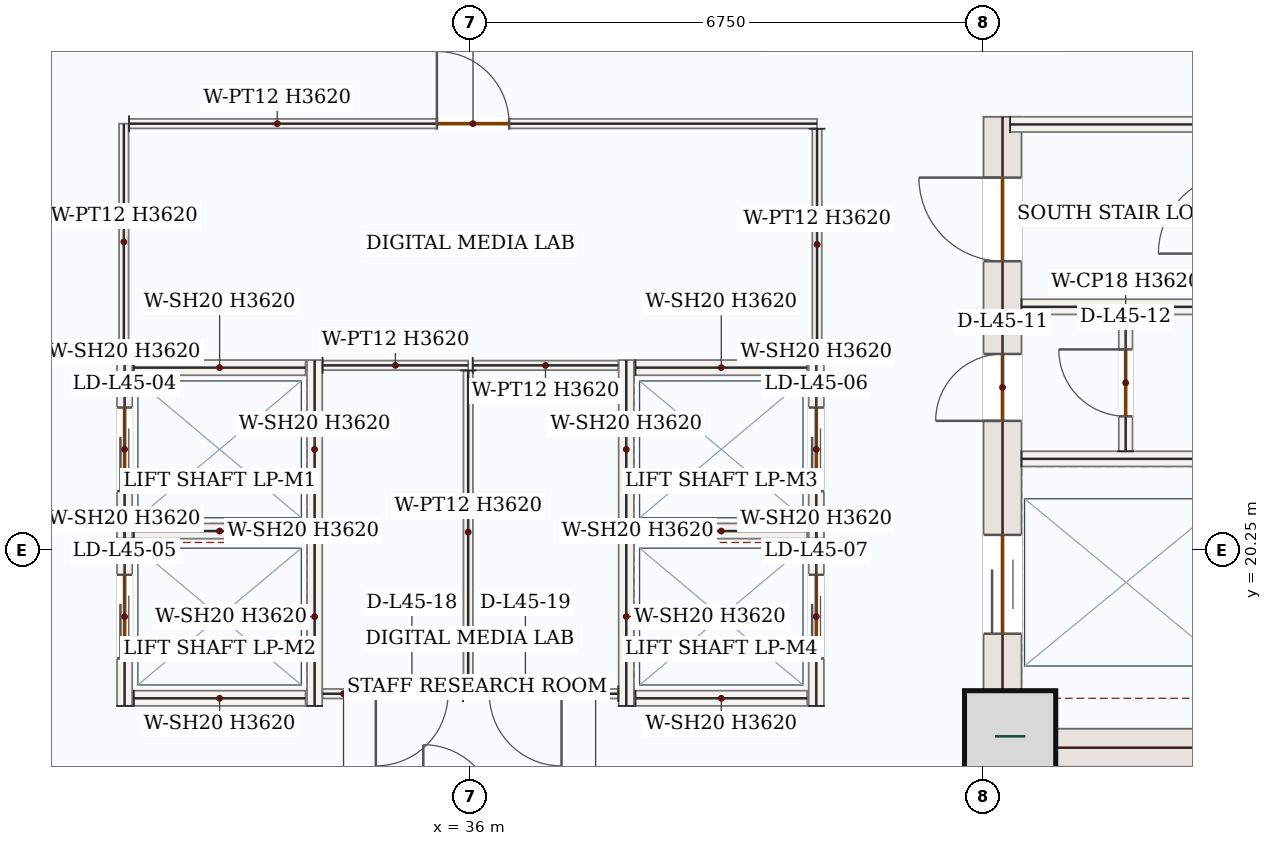
"""IFC4 building model, lengths in metres.
Left out: names, types, materials, properties, quantities, classifications, styles, units other than length and angle.
Written with IfcOpenShell. Run it as: python <this file> out.ifc"""

import sys

from ifc_helpers import new_model, si_unit, direction, frame, frame_2d, origin, origin_2d, place, context, subcontext, project, spatial, rectangle, extrude, source, transform, mapped, element, fill, save


model = new_model("IFC4")
c1 = context("Model", 3, precision=1e-05, world=origin(), true_north=direction((0.0, 1.0)))
c2 = subcontext(c1, "Body", "Model", "MODEL_VIEW")
j1 = project(units=[si_unit("LENGTHUNIT", "METRE"), si_unit("PLANEANGLEUNIT", "RADIAN")], contexts=[c1])
p1 = place(None, origin())
s1 = spatial("IfcSite", under=j1, at=p1, CompositionType="ELEMENT")
p2 = place(p1, origin())
s2 = spatial("IfcBuilding", under=s1, at=p2, CompositionType="ELEMENT")
p3 = place(p2, frame((0.0, 0.0, 194.1)))
s3 = spatial("IfcBuildingStorey", under=s2, at=p3, CompositionType="ELEMENT", Elevation=194.1)
p4 = place(p3, frame((43.0, 17.4, 0.0), z_axis=(0.0, 0.0, 1.0), x_axis=(0.0, 1.0, 0.0)))
e1 = element("IfcWall", 1, at=p4, inside=s3, PredefinedType="SHEAR", context=c2, shape_type="SweptSolid", body=[
    extrude(rectangle(XDim=8.55, YDim=0.5, at=frame_2d((4.275, 0.0))), origin(), (0.0, 0.0, 1.0), 3.62),
])
p5 = place(p4, frame((6.65, 0.0, 0.0)))
e2 = element("IfcOpeningElement", 2, at=p5, cuts=e1, PredefinedType="OPENING", context=c2, shape_type="SweptSolid", body=[
    extrude(rectangle(XDim=1.1, YDim=2.2, at=frame_2d((0.55, 1.1))), frame((0.0, 0.26, 0.0), z_axis=(0.0, -1.0, 0.0), x_axis=(1.0, 0.0, 0.0)), (0.0, 0.0, 1.0), 0.52),
])
p6 = place(p4, frame((1.75, 0.0, 0.0)))
e3 = element("IfcOpeningElement", 3, at=p6, cuts=e1, PredefinedType="OPENING", context=c2, shape_type="SweptSolid", body=[
    extrude(rectangle(XDim=1.3, YDim=2.2, at=frame_2d((0.65, 1.1))), frame((0.0, 0.26, 0.0), z_axis=(0.0, -1.0, 0.0), x_axis=(1.0, 0.0, 0.0)), (0.0, 0.0, 1.0), 0.52),
])
p7 = place(p4, frame((4.55, 0.0, 0.0)))
e4 = element("IfcOpeningElement", 4, at=p7, cuts=e1, PredefinedType="OPENING", context=c2, shape_type="SweptSolid", body=[
    extrude(rectangle(XDim=0.88, YDim=2.1, at=frame_2d((0.44, 1.05))), frame((0.0, 0.26, 0.0), z_axis=(0.0, -1.0, 0.0), x_axis=(1.0, 0.0, 0.0)), (0.0, 0.0, 1.0), 0.52),
])
m1 = source(origin(), c2, "Body", "SweptSolid", [
    extrude(rectangle(XDim=7.0, YDim=0.5, at=frame_2d((3.5, 0.0))), origin(), (0.0, 0.0, 1.0), 3.62),
])
p8 = place(p3, frame((43.25, 17.65, 0.0), z_axis=(0.0, 0.0, 1.0), x_axis=(1.0, 0.0, 0.0)))
e5 = element("IfcWall", 5, at=p8, inside=s3, PredefinedType="SHEAR", context=c2, shape_type="MappedRepresentation", body=[
    mapped(m1, transform((0.0, 0.0, 0.0), x_axis=(1.0, 0.0, 0.0), y_axis=(0.0, 1.0, 0.0), z_axis=(0.0, 0.0, 1.0), scale=1.0)),
])
m2 = source(origin(), c2, "Body", "SweptSolid", [
    extrude(rectangle(XDim=1.2, YDim=1.2, at=origin_2d()), origin(), (0.0, 0.0, 1.0), 3.9),
])
p9 = place(p3, frame((43.1, 17.8, 0.0), z_axis=(0.0, 0.0, 1.0), x_axis=(1.0, 0.0, 0.0)))
e6 = element("IfcColumn", 6, at=p9, inside=s3, PredefinedType="COLUMN", context=c2, shape_type="MappedRepresentation", body=[
    mapped(m2, transform((0.0, 0.0, 0.0), x_axis=(1.0, 0.0, 0.0), y_axis=(0.0, 1.0, 0.0), z_axis=(0.0, 0.0, 1.0), scale=1.0)),
])
m3 = source(origin(), c2, "Body", "SweptSolid", [
    extrude(rectangle(XDim=3.0, YDim=0.2, at=frame_2d((1.5, 0.0))), origin(), (0.0, 0.0, 1.0), 3.62),
])
p10 = place(p3, frame((43.1, 25.85, 0.0), z_axis=(0.0, 0.0, 1.0), x_axis=(1.0, 0.0, 0.0)))
e7 = element("IfcWall", 7, at=p10, inside=s3, PredefinedType="SOLIDWALL", context=c2, shape_type="MappedRepresentation", body=[
    mapped(m3, transform((0.0, 0.0, 0.0), x_axis=(1.0, 0.0, 0.0), y_axis=(0.0, 1.0, 0.0), z_axis=(0.0, 0.0, 1.0), scale=1.0)),
])
m4 = source(origin(), c2, "Body", "SweptSolid", [
    extrude(rectangle(XDim=2.75, YDim=0.2, at=frame_2d((1.375, 0.0))), origin(), (0.0, 0.0, 1.0), 3.62),
])
for number, where, z_axis, x_axis in (
    (8, (43.25, 23.45, 0.0), (0.0, 0.0, 1.0), (1.0, 0.0, 0.0)),
    (9, (43.25, 21.45, 0.0), (0.0, 0.0, 1.0), (1.0, 0.0, 0.0)),
):
    element("IfcWall", number, at=place(p3, frame(where, z_axis=z_axis, x_axis=x_axis)), inside=s3, PredefinedType="SOLIDWALL", context=c2, shape_type="MappedRepresentation", body=[
        mapped(m4, transform((0.0, 0.0, 0.0), x_axis=(1.0, 0.0, 0.0), y_axis=(0.0, 1.0, 0.0), z_axis=(0.0, 0.0, 1.0), scale=1.0)),
    ])
p11 = place(p3, frame((44.62, 21.55, 0.0), z_axis=(0.0, 0.0, 1.0), x_axis=(0.0, 1.0, 0.0)))
e10 = element("IfcWall", 10, at=p11, inside=s3, PredefinedType="PARTITIONING", context=c2, shape_type="SweptSolid", body=[
    extrude(rectangle(XDim=1.8, YDim=0.18, at=frame_2d((0.9, 0.0))), origin(), (0.0, 0.0, 1.0), 3.62),
])
p12 = place(p11, frame((0.46, 0.0, 0.0)))
e11 = element("IfcOpeningElement", 11, at=p12, cuts=e10, PredefinedType="OPENING", context=c2, shape_type="SweptSolid", body=[
    extrude(rectangle(XDim=0.88, YDim=2.1, at=frame_2d((0.44, 1.05))), frame((0.0, 0.1, 0.0), z_axis=(0.0, -1.0, 0.0), x_axis=(1.0, 0.0, 0.0)), (0.0, 0.0, 1.0), 0.2),
])
p13 = place(p3, frame((31.45, 20.4, 0.0), z_axis=(0.0, 0.0, 1.0), x_axis=(0.0, 1.0, 0.0)))
e12 = element("IfcWall", 12, at=p13, inside=s3, PredefinedType="SOLIDWALL", context=c2, shape_type="SweptSolid", body=[
    extrude(rectangle(XDim=2.35, YDim=0.2, at=frame_2d((1.175, 0.0))), origin(), (0.0, 0.0, 1.0), 3.62),
])
p14 = place(p13, frame((0.625, 0.0, 0.0)))
e13 = element("IfcOpeningElement", 13, at=p14, cuts=e12, PredefinedType="OPENING", context=c2, shape_type="SweptSolid", body=[
    extrude(rectangle(XDim=1.1, YDim=2.15, at=frame_2d((0.55, 1.075))), frame((0.0, 0.11, 0.0), z_axis=(0.0, -1.0, 0.0), x_axis=(1.0, 0.0, 0.0)), (0.0, 0.0, 1.0), 0.22),
])
m5 = source(origin(), c2, "Body", "SweptSolid", [
    extrude(rectangle(XDim=2.35, YDim=0.2, at=frame_2d((1.175, 0.0))), origin(), (0.0, 0.0, 1.0), 3.62),
])
p15 = place(p3, frame((33.95, 20.4, 0.0), z_axis=(0.0, 0.0, 1.0), x_axis=(0.0, 1.0, 0.0)))
e14 = element("IfcWall", 14, at=p15, inside=s3, PredefinedType="SOLIDWALL", context=c2, shape_type="MappedRepresentation", body=[
    mapped(m5, transform((0.0, 0.0, 0.0), x_axis=(1.0, 0.0, 0.0), y_axis=(0.0, 1.0, 0.0), z_axis=(0.0, 0.0, 1.0), scale=1.0)),
])
m6 = source(origin(), c2, "Body", "SweptSolid", [
    extrude(rectangle(XDim=2.26, YDim=0.2, at=frame_2d((1.13, 0.0))), origin(), (0.0, 0.0, 1.0), 3.62),
])
for number, where, z_axis, x_axis in (
    (15, (31.57, 20.5, 0.0), (0.0, 0.0, 1.0), (1.0, 0.0, 0.0)),
    (16, (31.57, 22.65, 0.0), (0.0, 0.0, 1.0), (1.0, 0.0, 0.0)),
):
    element("IfcWall", number, at=place(p3, frame(where, z_axis=z_axis, x_axis=x_axis)), inside=s3, PredefinedType="SOLIDWALL", context=c2, shape_type="MappedRepresentation", body=[
        mapped(m6, transform((0.0, 0.0, 0.0), x_axis=(1.0, 0.0, 0.0), y_axis=(0.0, 1.0, 0.0), z_axis=(0.0, 0.0, 1.0), scale=1.0)),
    ])
p16 = place(p3, frame((31.45, 18.2, 0.0), z_axis=(0.0, 0.0, 1.0), x_axis=(0.0, 1.0, 0.0)))
e17 = element("IfcWall", 17, at=p16, inside=s3, PredefinedType="SOLIDWALL", context=c2, shape_type="SweptSolid", body=[
    extrude(rectangle(XDim=2.35, YDim=0.2, at=frame_2d((1.175, 0.0))), origin(), (0.0, 0.0, 1.0), 3.62),
])
p17 = place(p16, frame((0.625, 0.0, 0.0)))
e18 = element("IfcOpeningElement", 18, at=p17, cuts=e17, PredefinedType="OPENING", context=c2, shape_type="SweptSolid", body=[
    extrude(rectangle(XDim=1.1, YDim=2.15, at=frame_2d((0.55, 1.075))), frame((0.0, 0.11, 0.0), z_axis=(0.0, -1.0, 0.0), x_axis=(1.0, 0.0, 0.0)), (0.0, 0.0, 1.0), 0.22),
])
p18 = place(p3, frame((33.95, 18.2, 0.0), z_axis=(0.0, 0.0, 1.0), x_axis=(0.0, 1.0, 0.0)))
e19 = element("IfcWall", 19, at=p18, inside=s3, PredefinedType="SOLIDWALL", context=c2, shape_type="MappedRepresentation", body=[
    mapped(m5, transform((0.0, 0.0, 0.0), x_axis=(1.0, 0.0, 0.0), y_axis=(0.0, 1.0, 0.0), z_axis=(0.0, 0.0, 1.0), scale=1.0)),
])
p19 = place(p3, frame((31.57, 18.3, 0.0), z_axis=(0.0, 0.0, 1.0), x_axis=(1.0, 0.0, 0.0)))
e20 = element("IfcWall", 20, at=p19, inside=s3, PredefinedType="SOLIDWALL", context=c2, shape_type="MappedRepresentation", body=[
    mapped(m6, transform((0.0, 0.0, 0.0), x_axis=(1.0, 0.0, 0.0), y_axis=(0.0, 1.0, 0.0), z_axis=(0.0, 0.0, 1.0), scale=1.0)),
])
p20 = place(p3, frame((38.05, 20.4, 0.0), z_axis=(0.0, 0.0, 1.0), x_axis=(0.0, 1.0, 0.0)))
e21 = element("IfcWall", 21, at=p20, inside=s3, PredefinedType="SOLIDWALL", context=c2, shape_type="MappedRepresentation", body=[
    mapped(m5, transform((0.0, 0.0, 0.0), x_axis=(1.0, 0.0, 0.0), y_axis=(0.0, 1.0, 0.0), z_axis=(0.0, 0.0, 1.0), scale=1.0)),
])
p21 = place(p3, frame((40.55, 20.4, 0.0), z_axis=(0.0, 0.0, 1.0), x_axis=(0.0, 1.0, 0.0)))
e22 = element("IfcWall", 22, at=p21, inside=s3, PredefinedType="SOLIDWALL", context=c2, shape_type="SweptSolid", body=[
    extrude(rectangle(XDim=2.35, YDim=0.2, at=frame_2d((1.175, 0.0))), origin(), (0.0, 0.0, 1.0), 3.62),
])
p22 = place(p21, frame((0.625, 0.0, 0.0)))
e23 = element("IfcOpeningElement", 23, at=p22, cuts=e22, PredefinedType="OPENING", context=c2, shape_type="SweptSolid", body=[
    extrude(rectangle(XDim=1.1, YDim=2.15, at=frame_2d((0.55, 1.075))), frame((0.0, 0.11, 0.0), z_axis=(0.0, -1.0, 0.0), x_axis=(1.0, 0.0, 0.0)), (0.0, 0.0, 1.0), 0.22),
])
for number, where, z_axis, x_axis in (
    (24, (38.17, 20.5, 0.0), (0.0, 0.0, 1.0), (1.0, 0.0, 0.0)),
    (25, (38.17, 22.65, 0.0), (0.0, 0.0, 1.0), (1.0, 0.0, 0.0)),
):
    element("IfcWall", number, at=place(p3, frame(where, z_axis=z_axis, x_axis=x_axis)), inside=s3, PredefinedType="SOLIDWALL", context=c2, shape_type="MappedRepresentation", body=[
        mapped(m6, transform((0.0, 0.0, 0.0), x_axis=(1.0, 0.0, 0.0), y_axis=(0.0, 1.0, 0.0), z_axis=(0.0, 0.0, 1.0), scale=1.0)),
    ])
p23 = place(p3, frame((38.05, 18.2, 0.0), z_axis=(0.0, 0.0, 1.0), x_axis=(0.0, 1.0, 0.0)))
e26 = element("IfcWall", 26, at=p23, inside=s3, PredefinedType="SOLIDWALL", context=c2, shape_type="MappedRepresentation", body=[
    mapped(m5, transform((0.0, 0.0, 0.0), x_axis=(1.0, 0.0, 0.0), y_axis=(0.0, 1.0, 0.0), z_axis=(0.0, 0.0, 1.0), scale=1.0)),
])
p24 = place(p3, frame((40.55, 18.2, 0.0), z_axis=(0.0, 0.0, 1.0), x_axis=(0.0, 1.0, 0.0)))
e27 = element("IfcWall", 27, at=p24, inside=s3, PredefinedType="SOLIDWALL", context=c2, shape_type="SweptSolid", body=[
    extrude(rectangle(XDim=2.35, YDim=0.2, at=frame_2d((1.175, 0.0))), origin(), (0.0, 0.0, 1.0), 3.62),
])
p25 = place(p24, frame((0.625, 0.0, 0.0)))
e28 = element("IfcOpeningElement", 28, at=p25, cuts=e27, PredefinedType="OPENING", context=c2, shape_type="SweptSolid", body=[
    extrude(rectangle(XDim=1.1, YDim=2.15, at=frame_2d((0.55, 1.075))), frame((0.0, 0.11, 0.0), z_axis=(0.0, -1.0, 0.0), x_axis=(1.0, 0.0, 0.0)), (0.0, 0.0, 1.0), 0.22),
])
p26 = place(p3, frame((38.17, 18.3, 0.0), z_axis=(0.0, 0.0, 1.0), x_axis=(1.0, 0.0, 0.0)))
e29 = element("IfcWall", 29, at=p26, inside=s3, PredefinedType="SOLIDWALL", context=c2, shape_type="MappedRepresentation", body=[
    mapped(m6, transform((0.0, 0.0, 0.0), x_axis=(1.0, 0.0, 0.0), y_axis=(0.0, 1.0, 0.0), z_axis=(0.0, 0.0, 1.0), scale=1.0)),
])
m7 = source(origin(), c2, "Body", "SweptSolid", [
    extrude(rectangle(XDim=1.915, YDim=0.125, at=frame_2d((0.958, 0.0))), origin(), (0.0, 0.0, 1.0), 3.62),
])
p27 = place(p3, frame((34.055, 22.68, 0.0), z_axis=(0.0, 0.0, 1.0), x_axis=(1.0, 0.0, 0.0)))
e30 = element("IfcWall", 30, at=p27, inside=s3, PredefinedType="PARTITIONING", context=c2, shape_type="MappedRepresentation", body=[
    mapped(m7, transform((0.0, 0.0, 0.0), x_axis=(1.0, 0.0, 0.0), y_axis=(0.0, 1.0, 0.0), z_axis=(0.0, 0.0, 1.0), scale=1.0)),
])
m8 = source(origin(), c2, "Body", "SweptSolid", [
    extrude(rectangle(XDim=4.252, YDim=0.125, at=frame_2d((2.126, 0.0))), origin(), (0.0, 0.0, 1.0), 3.62),
])
p28 = place(p3, frame((35.97, 22.613, 0.0), z_axis=(0.0, 0.0, 1.0), x_axis=(0.0, -1.0, 0.0)))
e31 = element("IfcWall", 31, at=p28, inside=s3, PredefinedType="PARTITIONING", context=c2, shape_type="MappedRepresentation", body=[
    mapped(m8, transform((0.0, 0.0, 0.0), x_axis=(1.0, 0.0, 0.0), y_axis=(0.0, 1.0, 0.0), z_axis=(0.0, 0.0, 1.0), scale=1.0)),
])
p29 = place(p3, frame((35.903, 18.36, 0.0), z_axis=(0.0, 0.0, 1.0), x_axis=(-1.0, 0.0, 0.0)))
e32 = element("IfcWall", 32, at=p29, inside=s3, PredefinedType="PARTITIONING", context=c2, shape_type="SweptSolid", body=[
    extrude(rectangle(XDim=1.848, YDim=0.125, at=frame_2d((0.924, 0.0))), origin(), (0.0, 0.0, 1.0), 3.62),
])
p30 = place(p29, frame((0.198, 0.0, 0.0)))
e33 = element("IfcOpeningElement", 33, at=p30, cuts=e32, PredefinedType="OPENING", context=c2, shape_type="SweptSolid", body=[
    extrude(rectangle(XDim=0.95, YDim=2.15, at=frame_2d((0.475, 1.075))), frame((0.0, 0.073, 0.0), z_axis=(0.0, -1.0, 0.0), x_axis=(1.0, 0.0, 0.0)), (0.0, 0.0, 1.0), 0.145),
])
p31 = place(p3, frame((36.03, 22.68, 0.0), z_axis=(0.0, 0.0, 1.0), x_axis=(1.0, 0.0, 0.0)))
e34 = element("IfcWall", 34, at=p31, inside=s3, PredefinedType="PARTITIONING", context=c2, shape_type="MappedRepresentation", body=[
    mapped(m7, transform((0.0, 0.0, 0.0), x_axis=(1.0, 0.0, 0.0), y_axis=(0.0, 1.0, 0.0), z_axis=(0.0, 0.0, 1.0), scale=1.0)),
])
p32 = place(p3, frame((37.945, 18.36, 0.0), z_axis=(0.0, 0.0, 1.0), x_axis=(-1.0, 0.0, 0.0)))
e35 = element("IfcWall", 35, at=p32, inside=s3, PredefinedType="PARTITIONING", context=c2, shape_type="SweptSolid", body=[
    extrude(rectangle(XDim=1.907, YDim=0.125, at=frame_2d((0.954, 0.0))), origin(), (0.0, 0.0, 1.0), 3.62),
])
p33 = place(p32, frame((0.747, 0.0, 0.0)))
e36 = element("IfcOpeningElement", 36, at=p33, cuts=e35, PredefinedType="OPENING", context=c2, shape_type="SweptSolid", body=[
    extrude(rectangle(XDim=0.95, YDim=2.15, at=frame_2d((0.475, 1.075))), frame((0.0, 0.073, 0.0), z_axis=(0.0, -1.0, 0.0), x_axis=(1.0, 0.0, 0.0)), (0.0, 0.0, 1.0), 0.145),
])
m9 = source(origin(), c2, "Body", "SweptSolid", [
    extrude(rectangle(XDim=3.11, YDim=0.125, at=frame_2d((1.555, 0.0))), origin(), (0.0, 0.0, 1.0), 3.62),
])
p34 = place(p3, frame((31.44, 22.75, 0.0), z_axis=(0.0, 0.0, 1.0), x_axis=(0.0, 1.0, 0.0)))
e37 = element("IfcWall", 37, at=p34, inside=s3, PredefinedType="PARTITIONING", context=c2, shape_type="MappedRepresentation", body=[
    mapped(m9, transform((0.0, 0.0, 0.0), x_axis=(1.0, 0.0, 0.0), y_axis=(0.0, 1.0, 0.0), z_axis=(0.0, 0.0, 1.0), scale=1.0)),
])
p35 = place(p3, frame((31.508, 25.86, 0.0), z_axis=(0.0, 0.0, 1.0), x_axis=(1.0, 0.0, 0.0)))
e38 = element("IfcWall", 38, at=p35, inside=s3, PredefinedType="PARTITIONING", context=c2, shape_type="SweptSolid", body=[
    extrude(rectangle(XDim=9.052, YDim=0.125, at=frame_2d((4.526, 0.0))), origin(), (0.0, 0.0, 1.0), 3.62),
])
p36 = place(p35, frame((4.051, 0.0, 0.0)))
e39 = element("IfcOpeningElement", 39, at=p36, cuts=e38, PredefinedType="OPENING", context=c2, shape_type="SweptSolid", body=[
    extrude(rectangle(XDim=0.95, YDim=2.15, at=frame_2d((0.475, 1.075))), frame((0.0, 0.073, 0.0), z_axis=(0.0, -1.0, 0.0), x_axis=(1.0, 0.0, 0.0)), (0.0, 0.0, 1.0), 0.145),
])
m10 = source(origin(), c2, "Body", "SweptSolid", [
    extrude(rectangle(XDim=3.042, YDim=0.125, at=frame_2d((1.521, 0.0))), origin(), (0.0, 0.0, 1.0), 3.62),
])
p37 = place(p3, frame((40.56, 25.792, 0.0), z_axis=(0.0, 0.0, 1.0), x_axis=(0.0, -1.0, 0.0)))
e40 = element("IfcWall", 40, at=p37, inside=s3, PredefinedType="PARTITIONING", context=c2, shape_type="MappedRepresentation", body=[
    mapped(m10, transform((0.0, 0.0, 0.0), x_axis=(1.0, 0.0, 0.0), y_axis=(0.0, 1.0, 0.0), z_axis=(0.0, 0.0, 1.0), scale=1.0)),
])
m11 = source(origin(), c2, "Body", "SweptSolid", [
    extrude(rectangle(XDim=1.1, YDim=2.2, at=frame_2d((0.55, 1.1))), frame((0.0, 0.025, 0.0), z_axis=(0.0, -1.0, 0.0), x_axis=(1.0, 0.0, 0.0)), (0.0, 0.0, 1.0), 0.05),
])
p38 = place(p5, origin())
e41 = element("IfcDoor", 41, at=p38, inside=s3, OperationType="SINGLE_SWING_RIGHT", PredefinedType="DOOR", context=c2, shape_type="MappedRepresentation", body=[
    mapped(m11, transform((0.0, 0.0, 0.0), x_axis=(1.0, 0.0, 0.0), y_axis=(0.0, 1.0, 0.0), z_axis=(0.0, 0.0, 1.0), scale=1.0)),
])
fill(e2, e41)
m12 = source(origin(), c2, "Body", "SweptSolid", [
    extrude(rectangle(XDim=1.3, YDim=2.2, at=frame_2d((0.65, 1.1))), frame((0.0, 0.025, 0.0), z_axis=(0.0, -1.0, 0.0), x_axis=(1.0, 0.0, 0.0)), (0.0, 0.0, 1.0), 0.05),
])
p39 = place(p6, origin())
e42 = element("IfcDoor", 42, at=p39, inside=s3, OperationType="DOUBLE_DOOR_SLIDING", PredefinedType="DOOR", context=c2, shape_type="MappedRepresentation", body=[
    mapped(m12, transform((0.0, 0.0, 0.0), x_axis=(1.0, 0.0, 0.0), y_axis=(0.0, 1.0, 0.0), z_axis=(0.0, 0.0, 1.0), scale=1.0)),
])
fill(e3, e42)
m13 = source(origin(), c2, "Body", "SweptSolid", [
    extrude(rectangle(XDim=0.88, YDim=2.1, at=frame_2d((0.44, 1.05))), frame((0.0, 0.025, 0.0), z_axis=(0.0, -1.0, 0.0), x_axis=(1.0, 0.0, 0.0)), (0.0, 0.0, 1.0), 0.05),
])
p40 = place(p7, origin())
e43 = element("IfcDoor", 43, at=p40, inside=s3, OperationType="SINGLE_SWING_LEFT", PredefinedType="DOOR", context=c2, shape_type="MappedRepresentation", body=[
    mapped(m13, transform((0.0, 0.0, 0.0), x_axis=(1.0, 0.0, 0.0), y_axis=(0.0, 1.0, 0.0), z_axis=(0.0, 0.0, 1.0), scale=1.0)),
])
fill(e4, e43)
p41 = place(p12, origin())
e44 = element("IfcDoor", 44, at=p41, inside=s3, OperationType="SINGLE_SWING_RIGHT", PredefinedType="DOOR", context=c2, shape_type="MappedRepresentation", body=[
    mapped(m13, transform((0.0, 0.0, 0.0), x_axis=(1.0, 0.0, 0.0), y_axis=(0.0, 1.0, 0.0), z_axis=(0.0, 0.0, 1.0), scale=1.0)),
])
fill(e11, e44)
m14 = source(origin(), c2, "Body", "SweptSolid", [
    extrude(rectangle(XDim=1.1, YDim=2.15, at=frame_2d((0.55, 1.075))), frame((0.0, 0.025, 0.0), z_axis=(0.0, -1.0, 0.0), x_axis=(1.0, 0.0, 0.0)), (0.0, 0.0, 1.0), 0.05),
])
p42 = place(p14, origin())
e45 = element("IfcDoor", 45, at=p42, inside=s3, OperationType="DOUBLE_DOOR_SLIDING", PredefinedType="DOOR", context=c2, shape_type="MappedRepresentation", body=[
    mapped(m14, transform((0.0, 0.0, 0.0), x_axis=(1.0, 0.0, 0.0), y_axis=(0.0, 1.0, 0.0), z_axis=(0.0, 0.0, 1.0), scale=1.0)),
])
fill(e13, e45)
p43 = place(p17, origin())
e46 = element("IfcDoor", 46, at=p43, inside=s3, OperationType="DOUBLE_DOOR_SLIDING", PredefinedType="DOOR", context=c2, shape_type="MappedRepresentation", body=[
    mapped(m14, transform((0.0, 0.0, 0.0), x_axis=(1.0, 0.0, 0.0), y_axis=(0.0, 1.0, 0.0), z_axis=(0.0, 0.0, 1.0), scale=1.0)),
])
fill(e18, e46)
p44 = place(p22, origin())
e47 = element("IfcDoor", 47, at=p44, inside=s3, OperationType="DOUBLE_DOOR_SLIDING", PredefinedType="DOOR", context=c2, shape_type="MappedRepresentation", body=[
    mapped(m14, transform((0.0, 0.0, 0.0), x_axis=(1.0, 0.0, 0.0), y_axis=(0.0, 1.0, 0.0), z_axis=(0.0, 0.0, 1.0), scale=1.0)),
])
fill(e23, e47)
p45 = place(p25, origin())
e48 = element("IfcDoor", 48, at=p45, inside=s3, OperationType="DOUBLE_DOOR_SLIDING", PredefinedType="DOOR", context=c2, shape_type="MappedRepresentation", body=[
    mapped(m14, transform((0.0, 0.0, 0.0), x_axis=(1.0, 0.0, 0.0), y_axis=(0.0, 1.0, 0.0), z_axis=(0.0, 0.0, 1.0), scale=1.0)),
])
fill(e28, e48)
m15 = source(origin(), c2, "Body", "SweptSolid", [
    extrude(rectangle(XDim=0.95, YDim=2.15, at=frame_2d((0.475, 1.075))), frame((0.0, 0.025, 0.0), z_axis=(0.0, -1.0, 0.0), x_axis=(1.0, 0.0, 0.0)), (0.0, 0.0, 1.0), 0.05),
])
p46 = place(p36, origin())
e49 = element("IfcDoor", 49, at=p46, inside=s3, OperationType="SINGLE_SWING_LEFT", PredefinedType="DOOR", context=c2, shape_type="MappedRepresentation", body=[
    mapped(m15, transform((0.0, 0.0, 0.0), x_axis=(1.0, 0.0, 0.0), y_axis=(0.0, 1.0, 0.0), z_axis=(0.0, 0.0, 1.0), scale=1.0)),
])
fill(e39, e49)
p47 = place(p30, origin())
e50 = element("IfcDoor", 50, at=p47, inside=s3, OperationType="SINGLE_SWING_RIGHT", PredefinedType="DOOR", context=c2, shape_type="MappedRepresentation", body=[
    mapped(m15, transform((0.0, 0.0, 0.0), x_axis=(1.0, 0.0, 0.0), y_axis=(0.0, 1.0, 0.0), z_axis=(0.0, 0.0, 1.0), scale=1.0)),
])
fill(e33, e50)
p48 = place(p33, origin())
e51 = element("IfcDoor", 51, at=p48, inside=s3, OperationType="SINGLE_SWING_LEFT", PredefinedType="DOOR", context=c2, shape_type="MappedRepresentation", body=[
    mapped(m15, transform((0.0, 0.0, 0.0), x_axis=(1.0, 0.0, 0.0), y_axis=(0.0, 1.0, 0.0), z_axis=(0.0, 0.0, 1.0), scale=1.0)),
])
fill(e36, e51)
save(model, sys.argv[1])
